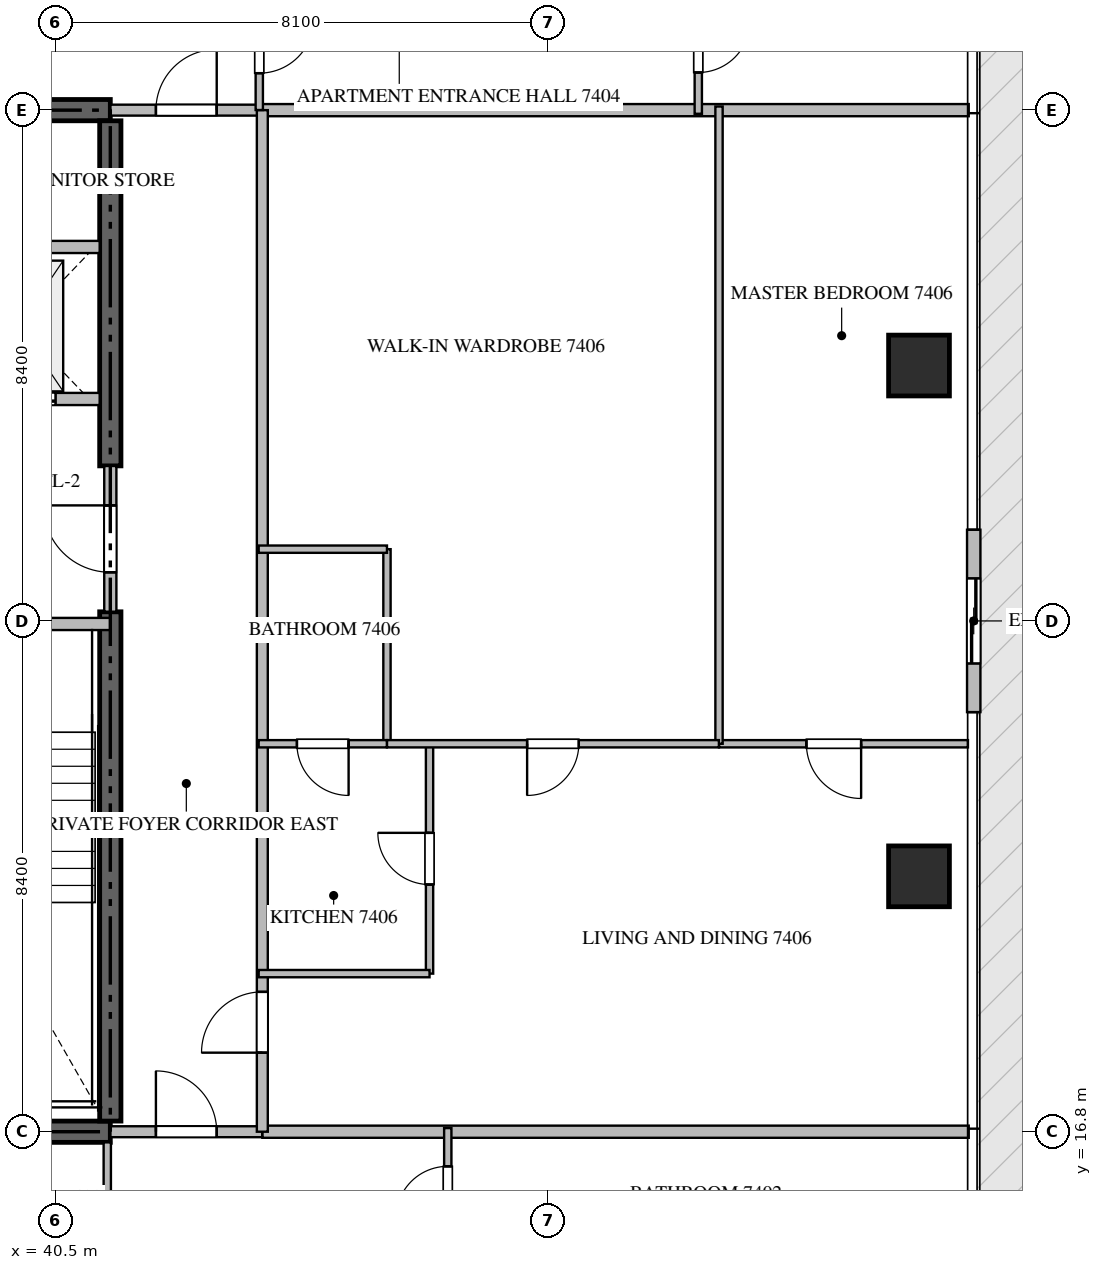
"""IFC4 building model, lengths in metres.
Left out: names, types, materials, properties, quantities, classifications, styles, units other than length and angle.
Written with IfcOpenShell. Run it as: python <this file> out.ifc"""

import sys

from ifc_helpers import new_model, si_unit, direction, frame, frame_2d, origin, origin_2d, place, context, subcontext, project, spatial, rectangle, extrude, source, transform, mapped, element, fill, save


model = new_model("IFC4")
c1 = context("Model", 3, precision=1e-05, world=origin(), true_north=direction((0.0, 1.0)))
c2 = subcontext(c1, "Body", "Model", "MODEL_VIEW")
j1 = project(units=[si_unit("LENGTHUNIT", "METRE"), si_unit("PLANEANGLEUNIT", "RADIAN")], contexts=[c1])
p1 = place(None, origin())
s1 = spatial("IfcSite", under=j1, at=p1, CompositionType="ELEMENT")
p2 = place(p1, origin())
s2 = spatial("IfcBuilding", under=s1, at=p2, CompositionType="ELEMENT")
p3 = place(p2, frame((0.0, 0.0, 297.5)))
s3 = spatial("IfcBuildingStorey", under=s2, at=p3, CompositionType="ELEMENT", Elevation=297.5)
for number, where, z_axis, x_axis in (
    (1, (23.4, 16.8, -0.26), (0.0, 0.0, 1.0), (1.0, 0.0, 0.0)),
    (2, (41.4, 33.6, -0.26), (0.0, 0.0, 1.0), (-1.0, 0.0, 0.0)),
):
    element("IfcWall", number, at=place(p3, frame(where, z_axis=z_axis, x_axis=x_axis)), inside=s3, PredefinedType="SHEAR", context=c2, shape_type="SweptSolid", body=[
        extrude(rectangle(XDim=18.0, YDim=0.35, at=frame_2d((9.0, 0.0))), origin(), (0.0, 0.0, 1.0), 4.048),
    ])
p4 = place(p3, frame((41.4, 16.975, -0.26), z_axis=(0.0, 0.0, 1.0), x_axis=(0.0, 1.0, 0.0)))
e3 = element("IfcWall", 3, at=p4, inside=s3, PredefinedType="SHEAR", context=c2, shape_type="SweptSolid", body=[
    extrude(rectangle(XDim=8.375, YDim=0.35, at=frame_2d((4.188, 0.0))), origin(), (0.0, 0.0, 1.0), 4.048),
])
p5 = place(p3, frame((41.4, 27.75, -0.26), z_axis=(0.0, 0.0, 1.0), x_axis=(0.0, 1.0, 0.0)))
e4 = element("IfcWall", 4, at=p5, inside=s3, PredefinedType="SHEAR", context=c2, shape_type="SweptSolid", body=[
    extrude(rectangle(XDim=5.675, YDim=0.35, at=frame_2d((2.837, 0.0))), origin(), (0.0, 0.0, 1.0), 4.048),
])
m1 = source(origin(), c2, "Body", "SweptSolid", [
    extrude(rectangle(XDim=1.0, YDim=1.0, at=origin_2d()), origin(), (0.0, 0.0, 1.0), 4.05),
])
for number, where, z_axis, x_axis in (
    (5, (54.7, 21.0, -0.26), (0.0, 0.0, 1.0), (1.0, 0.0, 0.0)),
    (6, (54.7, 29.4, -0.26), (0.0, 0.0, 1.0), (1.0, 0.0, 0.0)),
):
    element("IfcColumn", number, at=place(p3, frame(where, z_axis=z_axis, x_axis=x_axis)), inside=s3, PredefinedType="COLUMN", context=c2, shape_type="MappedRepresentation", body=[
        mapped(m1, transform((0.0, 0.0, 0.0), scale=1.0)),
    ])
p6 = place(p3, frame((55.6, 23.7, 0.0), z_axis=(0.0, 0.0, 1.0), x_axis=(0.0, 1.0, 0.0)))
e7 = element("IfcWall", 7, at=p6, inside=s3, PredefinedType="ELEMENTEDWALL", context=c2, shape_type="SweptSolid", body=[
    extrude(rectangle(XDim=3.0, YDim=0.22, at=frame_2d((1.5, 0.0))), origin(), (0.0, 0.0, 1.0), 3.775),
])
p7 = place(p6, frame((0.8, 0.0, 0.0)))
e8 = element("IfcOpeningElement", 8, at=p7, cuts=e7, PredefinedType="OPENING", context=c2, shape_type="SweptSolid", body=[
    extrude(rectangle(XDim=1.4, YDim=2.25, at=frame_2d((0.7, 1.125))), frame((0.0, 0.12, 0.0), z_axis=(0.0, -1.0, 0.0), x_axis=(1.0, 0.0, 0.0)), (0.0, 0.0, 1.0), 0.24),
])
p8 = place(p3, frame((36.95, 25.15, 0.0), z_axis=(0.0, 0.0, 1.0), x_axis=(1.0, 0.0, 0.0)))
e9 = element("IfcWall", 9, at=p8, inside=s3, PredefinedType="STANDARD", context=c2, shape_type="SweptSolid", body=[
    extrude(rectangle(XDim=4.45, YDim=0.2, at=frame_2d((2.225, 0.0))), origin(), (0.0, 0.0, 1.0), 3.79),
])
p9 = place(p8, frame((1.65, 0.0, 0.0)))
e10 = element("IfcOpeningElement", 10, at=p9, cuts=e9, PredefinedType="OPENING", context=c2, shape_type="SweptSolid", body=[
    extrude(rectangle(XDim=1.1, YDim=2.15, at=frame_2d((0.55, 1.075))), frame((0.0, 0.11, 0.0), z_axis=(0.0, -1.0, 0.0), x_axis=(1.0, 0.0, 0.0)), (0.0, 0.0, 1.0), 0.22),
])
p10 = place(p3, frame((38.75, 28.85, 0.0), z_axis=(0.0, 0.0, 1.0), x_axis=(1.0, 0.0, 0.0)))
e11 = element("IfcWall", 11, at=p10, inside=s3, PredefinedType="STANDARD", context=c2, shape_type="SweptSolid", body=[
    extrude(rectangle(XDim=2.475, YDim=0.2, at=frame_2d((1.238, 0.0))), origin(), (0.0, 0.0, 1.0), 3.79),
])
p11 = place(p10, frame((0.55, 0.0, 0.0)))
e12 = element("IfcOpeningElement", 12, at=p11, cuts=e11, PredefinedType="OPENING", context=c2, shape_type="SweptSolid", body=[
    extrude(rectangle(XDim=1.2, YDim=2.2, at=frame_2d((0.6, 1.1))), frame((0.0, 0.11, 0.0), z_axis=(0.0, -1.0, 0.0), x_axis=(1.0, 0.0, 0.0)), (0.0, 0.0, 1.0), 0.22),
])
p12 = place(p3, frame((38.75, 31.35, 0.0), z_axis=(0.0, 0.0, 1.0), x_axis=(1.0, 0.0, 0.0)))
e13 = element("IfcWall", 13, at=p12, inside=s3, PredefinedType="STANDARD", context=c2, shape_type="SweptSolid", body=[
    extrude(rectangle(XDim=2.475, YDim=0.2, at=frame_2d((1.238, 0.0))), origin(), (0.0, 0.0, 1.0), 3.79),
])
p13 = place(p3, frame((41.4, 25.352, 0.0), z_axis=(0.0, 0.0, 1.0), x_axis=(0.0, 1.0, 0.0)))
e14 = element("IfcWall", 14, at=p13, inside=s3, PredefinedType="STANDARD", context=c2, shape_type="SweptSolid", body=[
    extrude(rectangle(XDim=2.396, YDim=0.2, at=frame_2d((1.198, 0.0))), origin(), (0.0, 0.0, 1.0), 3.79),
])
p14 = place(p13, frame((0.648, 0.0, 0.0)))
e15 = element("IfcOpeningElement", 15, at=p14, cuts=e14, PredefinedType="OPENING", context=c2, shape_type="SweptSolid", body=[
    extrude(rectangle(XDim=1.1, YDim=2.15, at=frame_2d((0.55, 1.075))), frame((0.0, 0.11, 0.0), z_axis=(0.0, -1.0, 0.0), x_axis=(1.0, 0.0, 0.0)), (0.0, 0.0, 1.0), 0.22),
])
for number, where, z_axis, x_axis in (
    (16, (43.9, 16.8, 0.0), (0.0, 0.0, 1.0), (1.0, 0.0, 0.0)),
    (17, (43.9, 33.6, 0.0), (0.0, 0.0, 1.0), (1.0, 0.0, 0.0)),
):
    element("IfcWall", number, at=place(p3, frame(where, z_axis=z_axis, x_axis=x_axis)), inside=s3, PredefinedType="PARTITIONING", context=c2, shape_type="SweptSolid", body=[
        extrude(rectangle(XDim=11.618, YDim=0.2, at=frame_2d((5.809, 0.0))), origin(), (0.0, 0.0, 1.0), 3.79),
    ])
p15 = place(p3, frame((41.402, 16.8, 0.0), z_axis=(0.0, 0.0, 1.0), x_axis=(1.0, 0.0, 0.0)))
e18 = element("IfcWall", 18, at=p15, inside=s3, PredefinedType="PARTITIONING", context=c2, shape_type="SweptSolid", body=[
    extrude(rectangle(XDim=2.496, YDim=0.18, at=frame_2d((1.248, 0.0))), origin(), (0.0, 0.0, 1.0), 3.79),
])
p16 = place(p15, frame((0.748, 0.0, 0.0)))
e19 = element("IfcOpeningElement", 19, at=p16, cuts=e18, PredefinedType="OPENING", context=c2, shape_type="SweptSolid", body=[
    extrude(rectangle(XDim=1.0, YDim=2.15, at=frame_2d((0.5, 1.075))), frame((0.0, 0.1, 0.0), z_axis=(0.0, -1.0, 0.0), x_axis=(1.0, 0.0, 0.0)), (0.0, 0.0, 1.0), 0.2),
])
p17 = place(p3, frame((41.402, 33.6, 0.0), z_axis=(0.0, 0.0, 1.0), x_axis=(1.0, 0.0, 0.0)))
e20 = element("IfcWall", 20, at=p17, inside=s3, PredefinedType="PARTITIONING", context=c2, shape_type="SweptSolid", body=[
    extrude(rectangle(XDim=2.496, YDim=0.18, at=frame_2d((1.248, 0.0))), origin(), (0.0, 0.0, 1.0), 3.79),
])
p18 = place(p17, frame((0.748, 0.0, 0.0)))
e21 = element("IfcOpeningElement", 21, at=p18, cuts=e20, PredefinedType="OPENING", context=c2, shape_type="SweptSolid", body=[
    extrude(rectangle(XDim=1.0, YDim=2.15, at=frame_2d((0.5, 1.075))), frame((0.0, 0.1, 0.0), z_axis=(0.0, -1.0, 0.0), x_axis=(1.0, 0.0, 0.0)), (0.0, 0.0, 1.0), 0.2),
])
p19 = place(p3, frame((43.9, 16.8, 0.0), z_axis=(0.0, 0.0, 1.0), x_axis=(0.0, 1.0, 0.0)))
e22 = element("IfcWall", 22, at=p19, inside=s3, PredefinedType="PARTITIONING", context=c2, shape_type="SweptSolid", body=[
    extrude(rectangle(XDim=16.8, YDim=0.18, at=frame_2d((8.4, 0.0))), origin(), (0.0, 0.0, 1.0), 3.79),
])
p20 = place(p19, frame((1.3, 0.0, 0.0)))
e23 = element("IfcOpeningElement", 23, at=p20, cuts=e22, PredefinedType="OPENING", context=c2, shape_type="SweptSolid", body=[
    extrude(rectangle(XDim=1.0, YDim=2.15, at=frame_2d((0.5, 1.075))), frame((0.0, 0.1, 0.0), z_axis=(0.0, -1.0, 0.0), x_axis=(1.0, 0.0, 0.0)), (0.0, 0.0, 1.0), 0.2),
])
p21 = place(p3, frame((41.35, 14.05, 0.0), z_axis=(0.0, 0.0, 1.0), x_axis=(0.0, 1.0, 0.0)))
e24 = element("IfcWall", 24, at=p21, inside=s3, PredefinedType="PARTITIONING", context=c2, shape_type="SweptSolid", body=[
    extrude(rectangle(XDim=2.575, YDim=0.12, at=frame_2d((1.288, 0.0))), origin(), (0.0, 0.0, 1.0), 3.79),
])
p22 = place(p3, frame((46.95, 14.752, 0.0), z_axis=(0.0, 0.0, 1.0), x_axis=(0.0, 1.0, 0.0)))
e25 = element("IfcWall", 25, at=p22, inside=s3, PredefinedType="PARTITIONING", context=c2, shape_type="SweptSolid", body=[
    extrude(rectangle(XDim=2.108, YDim=0.12, at=frame_2d((1.054, 0.0))), origin(), (0.0, 0.0, 1.0), 3.372),
])
p23 = place(p22, frame((0.629, 0.0, 0.0)))
e26 = element("IfcOpeningElement", 26, at=p23, cuts=e25, PredefinedType="OPENING", context=c2, shape_type="SweptSolid", body=[
    extrude(rectangle(XDim=0.85, YDim=2.1, at=frame_2d((0.425, 1.05))), frame((0.0, 0.07, 0.0), z_axis=(0.0, -1.0, 0.0), x_axis=(1.0, 0.0, 0.0)), (0.0, 0.0, 1.0), 0.14),
])
p24 = place(p3, frame((43.85, 35.75, 0.0), z_axis=(0.0, 0.0, 1.0), x_axis=(0.0, -1.0, 0.0)))
e27 = element("IfcWall", 27, at=p24, inside=s3, PredefinedType="PARTITIONING", context=c2, shape_type="SweptSolid", body=[
    extrude(rectangle(XDim=2.148, YDim=0.12, at=frame_2d((1.074, 0.0))), origin(), (0.0, 0.0, 1.0), 3.79),
])
p25 = place(p24, frame((0.642, 0.0, 0.0)))
e28 = element("IfcOpeningElement", 28, at=p25, cuts=e27, PredefinedType="OPENING", context=c2, shape_type="SweptSolid", body=[
    extrude(rectangle(XDim=0.9, YDim=2.1, at=frame_2d((0.45, 1.05))), frame((0.0, 0.07, 0.0), z_axis=(0.0, -1.0, 0.0), x_axis=(1.0, 0.0, 0.0)), (0.0, 0.0, 1.0), 0.14),
])
p26 = place(p3, frame((51.07, 35.748, 0.0), z_axis=(0.0, 0.0, 1.0), x_axis=(0.0, -1.0, 0.0)))
e29 = element("IfcWall", 29, at=p26, inside=s3, PredefinedType="PARTITIONING", context=c2, shape_type="SweptSolid", body=[
    extrude(rectangle(XDim=2.208, YDim=0.12, at=frame_2d((1.104, 0.0))), origin(), (0.0, 0.0, 1.0), 3.79),
])
p27 = place(p26, frame((0.679, 0.0, 0.0)))
e30 = element("IfcOpeningElement", 30, at=p27, cuts=e29, PredefinedType="OPENING", context=c2, shape_type="SweptSolid", body=[
    extrude(rectangle(XDim=0.85, YDim=2.1, at=frame_2d((0.425, 1.05))), frame((0.0, 0.07, 0.0), z_axis=(0.0, -1.0, 0.0), x_axis=(1.0, 0.0, 0.0)), (0.0, 0.0, 1.0), 0.14),
])
p28 = place(p3, frame((46.65, 19.4, 0.0), z_axis=(0.0, 0.0, 1.0), x_axis=(0.0, 1.0, 0.0)))
e31 = element("IfcWall", 31, at=p28, inside=s3, PredefinedType="PARTITIONING", context=c2, shape_type="SweptSolid", body=[
    extrude(rectangle(XDim=3.78, YDim=0.12, at=frame_2d((1.89, 0.0))), origin(), (0.0, 0.0, 1.0), 3.79),
])
p29 = place(p28, frame((1.465, 0.0, 0.0)))
e32 = element("IfcOpeningElement", 32, at=p29, cuts=e31, PredefinedType="OPENING", context=c2, shape_type="SweptSolid", body=[
    extrude(rectangle(XDim=0.85, YDim=2.1, at=frame_2d((0.425, 1.05))), frame((0.0, 0.07, 0.0), z_axis=(0.0, -1.0, 0.0), x_axis=(1.0, 0.0, 0.0)), (0.0, 0.0, 1.0), 0.14),
])
p30 = place(p3, frame((46.65, 19.4, 0.0), z_axis=(0.0, 0.0, 1.0), x_axis=(-1.0, 0.0, 0.0)))
e33 = element("IfcWall", 33, at=p30, inside=s3, PredefinedType="PARTITIONING", context=c2, shape_type="SweptSolid", body=[
    extrude(rectangle(XDim=2.81, YDim=0.12, at=frame_2d((1.405, 0.0))), origin(), (0.0, 0.0, 1.0), 3.79),
])
p31 = place(p3, frame((55.505, 23.18, 0.0), z_axis=(0.0, 0.0, 1.0), x_axis=(-1.0, 0.0, 0.0)))
e34 = element("IfcWall", 34, at=p31, inside=s3, PredefinedType="PARTITIONING", context=c2, shape_type="SweptSolid", body=[
    extrude(rectangle(XDim=4.094, YDim=0.12, at=frame_2d((2.047, 0.0))), origin(), (0.0, 0.0, 1.0), 3.79),
])
p32 = place(p31, frame((1.757, 0.0, 0.0)))
e35 = element("IfcOpeningElement", 35, at=p32, cuts=e34, PredefinedType="OPENING", context=c2, shape_type="SweptSolid", body=[
    extrude(rectangle(XDim=0.9, YDim=2.1, at=frame_2d((0.45, 1.05))), frame((0.0, 0.07, 0.0), z_axis=(0.0, -1.0, 0.0), x_axis=(1.0, 0.0, 0.0)), (0.0, 0.0, 1.0), 0.14),
])
p33 = place(p3, frame((51.411, 23.18, 0.0), z_axis=(0.0, 0.0, 1.0), x_axis=(0.0, 1.0, 0.0)))
e36 = element("IfcWall", 36, at=p33, inside=s3, PredefinedType="PARTITIONING", context=c2, shape_type="SweptSolid", body=[
    extrude(rectangle(XDim=10.48, YDim=0.12, at=frame_2d((5.24, 0.0))), origin(), (0.0, 0.0, 1.0), 3.79),
])
p34 = place(p3, frame((45.95, 23.18, 0.0), z_axis=(0.0, 0.0, 1.0), x_axis=(0.0, 1.0, 0.0)))
e37 = element("IfcWall", 37, at=p34, inside=s3, PredefinedType="PARTITIONING", context=c2, shape_type="SweptSolid", body=[
    extrude(rectangle(XDim=3.2, YDim=0.12, at=frame_2d((1.6, 0.0))), origin(), (0.0, 0.0, 1.0), 3.79),
])
p35 = place(p3, frame((45.95, 26.38, 0.0), z_axis=(0.0, 0.0, 1.0), x_axis=(-1.0, 0.0, 0.0)))
e38 = element("IfcWall", 38, at=p35, inside=s3, PredefinedType="PARTITIONING", context=c2, shape_type="SweptSolid", body=[
    extrude(rectangle(XDim=2.11, YDim=0.12, at=frame_2d((1.055, 0.0))), origin(), (0.0, 0.0, 1.0), 3.79),
])
p36 = place(p3, frame((51.409, 23.18, 0.0), z_axis=(0.0, 0.0, 1.0), x_axis=(-1.0, 0.0, 0.0)))
e39 = element("IfcWall", 39, at=p36, inside=s3, PredefinedType="PARTITIONING", context=c2, shape_type="SweptSolid", body=[
    extrude(rectangle(XDim=5.459, YDim=0.12, at=frame_2d((2.729, 0.0))), origin(), (0.0, 0.0, 1.0), 3.79),
])
p37 = place(p36, frame((2.304, 0.0, 0.0)))
e40 = element("IfcOpeningElement", 40, at=p37, cuts=e39, PredefinedType="OPENING", context=c2, shape_type="SweptSolid", body=[
    extrude(rectangle(XDim=0.85, YDim=2.1, at=frame_2d((0.425, 1.05))), frame((0.0, 0.07, 0.0), z_axis=(0.0, -1.0, 0.0), x_axis=(1.0, 0.0, 0.0)), (0.0, 0.0, 1.0), 0.14),
])
p38 = place(p3, frame((45.948, 23.18, 0.0), z_axis=(0.0, 0.0, 1.0), x_axis=(-1.0, 0.0, 0.0)))
e41 = element("IfcWall", 41, at=p38, inside=s3, PredefinedType="PARTITIONING", context=c2, shape_type="SweptSolid", body=[
    extrude(rectangle(XDim=2.108, YDim=0.12, at=frame_2d((1.054, 0.0))), origin(), (0.0, 0.0, 1.0), 3.79),
])
p39 = place(p38, frame((0.629, 0.0, 0.0)))
e42 = element("IfcOpeningElement", 42, at=p39, cuts=e41, PredefinedType="OPENING", context=c2, shape_type="SweptSolid", body=[
    extrude(rectangle(XDim=0.85, YDim=2.1, at=frame_2d((0.425, 1.05))), frame((0.0, 0.07, 0.0), z_axis=(0.0, -1.0, 0.0), x_axis=(1.0, 0.0, 0.0)), (0.0, 0.0, 1.0), 0.14),
])
m2 = source(origin(), c2, "Body", "SweptSolid", [
    extrude(rectangle(XDim=1.4, YDim=2.25, at=frame_2d((0.7, 1.125))), frame((0.0, 0.025, 0.0), z_axis=(0.0, -1.0, 0.0), x_axis=(1.0, 0.0, 0.0)), (0.0, 0.0, 1.0), 0.05),
])
p40 = place(p7, origin())
e43 = element("IfcDoor", 43, at=p40, inside=s3, OperationType="SLIDING_TO_LEFT", PredefinedType="DOOR", context=c2, shape_type="MappedRepresentation", body=[
    mapped(m2, transform((0.0, 0.0, 0.0), scale=1.0)),
])
fill(e8, e43)
m3 = source(origin(), c2, "Body", "SweptSolid", [
    extrude(rectangle(XDim=1.2, YDim=2.2, at=frame_2d((0.6, 1.1))), frame((0.0, 0.025, 0.0), z_axis=(0.0, -1.0, 0.0), x_axis=(1.0, 0.0, 0.0)), (0.0, 0.0, 1.0), 0.05),
])
p41 = place(p11, origin())
e44 = element("IfcDoor", 44, at=p41, inside=s3, OperationType="DOUBLE_DOOR_SLIDING", PredefinedType="DOOR", context=c2, shape_type="MappedRepresentation", body=[
    mapped(m3, transform((0.0, 0.0, 0.0), scale=1.0)),
])
fill(e12, e44)
m4 = source(origin(), c2, "Body", "SweptSolid", [
    extrude(rectangle(XDim=1.1, YDim=2.15, at=frame_2d((0.55, 1.075))), frame((0.0, 0.025, 0.0), z_axis=(0.0, -1.0, 0.0), x_axis=(1.0, 0.0, 0.0)), (0.0, 0.0, 1.0), 0.05),
])
p42 = place(p14, origin())
e45 = element("IfcDoor", 45, at=p42, inside=s3, OperationType="SINGLE_SWING_RIGHT", PredefinedType="DOOR", context=c2, shape_type="MappedRepresentation", body=[
    mapped(m4, transform((0.0, 0.0, 0.0), scale=1.0)),
])
fill(e15, e45)
m5 = source(origin(), c2, "Body", "SweptSolid", [
    extrude(rectangle(XDim=1.0, YDim=2.15, at=frame_2d((0.5, 1.075))), frame((0.0, 0.025, 0.0), z_axis=(0.0, -1.0, 0.0), x_axis=(1.0, 0.0, 0.0)), (0.0, 0.0, 1.0), 0.05),
])
p43 = place(p16, origin())
e46 = element("IfcDoor", 46, at=p43, inside=s3, OperationType="SINGLE_SWING_LEFT", PredefinedType="DOOR", context=c2, shape_type="MappedRepresentation", body=[
    mapped(m5, transform((0.0, 0.0, 0.0), scale=1.0)),
])
fill(e19, e46)
p44 = place(p18, origin())
e47 = element("IfcDoor", 47, at=p44, inside=s3, OperationType="SINGLE_SWING_RIGHT", PredefinedType="DOOR", context=c2, shape_type="MappedRepresentation", body=[
    mapped(m5, transform((0.0, 0.0, 0.0), scale=1.0)),
])
fill(e21, e47)
p45 = place(p20, origin())
e48 = element("IfcDoor", 48, at=p45, inside=s3, OperationType="SINGLE_SWING_LEFT", PredefinedType="DOOR", context=c2, shape_type="MappedRepresentation", body=[
    mapped(m5, transform((0.0, 0.0, 0.0), scale=1.0)),
])
fill(e23, e48)
m6 = source(origin(), c2, "Body", "SweptSolid", [
    extrude(rectangle(XDim=0.85, YDim=2.1, at=frame_2d((0.425, 1.05))), frame((0.0, 0.025, 0.0), z_axis=(0.0, -1.0, 0.0), x_axis=(1.0, 0.0, 0.0)), (0.0, 0.0, 1.0), 0.05),
])
p46 = place(p23, origin())
e49 = element("IfcDoor", 49, at=p46, inside=s3, OperationType="SINGLE_SWING_LEFT", PredefinedType="DOOR", context=c2, shape_type="MappedRepresentation", body=[
    mapped(m6, transform((0.0, 0.0, 0.0), scale=1.0)),
])
fill(e26, e49)
m7 = source(origin(), c2, "Body", "SweptSolid", [
    extrude(rectangle(XDim=0.9, YDim=2.1, at=frame_2d((0.45, 1.05))), frame((0.0, 0.025, 0.0), z_axis=(0.0, -1.0, 0.0), x_axis=(1.0, 0.0, 0.0)), (0.0, 0.0, 1.0), 0.05),
])
p47 = place(p25, origin())
e50 = element("IfcDoor", 50, at=p47, inside=s3, OperationType="SINGLE_SWING_LEFT", PredefinedType="DOOR", context=c2, shape_type="MappedRepresentation", body=[
    mapped(m7, transform((0.0, 0.0, 0.0), scale=1.0)),
])
fill(e28, e50)
p48 = place(p27, origin())
e51 = element("IfcDoor", 51, at=p48, inside=s3, OperationType="SINGLE_SWING_LEFT", PredefinedType="DOOR", context=c2, shape_type="MappedRepresentation", body=[
    mapped(m6, transform((0.0, 0.0, 0.0), scale=1.0)),
])
fill(e30, e51)
p49 = place(p29, origin())
e52 = element("IfcDoor", 52, at=p49, inside=s3, OperationType="SINGLE_SWING_RIGHT", PredefinedType="DOOR", context=c2, shape_type="MappedRepresentation", body=[
    mapped(m6, transform((0.0, 0.0, 0.0), scale=1.0)),
])
fill(e32, e52)
p50 = place(p32, origin())
e53 = element("IfcDoor", 53, at=p50, inside=s3, OperationType="SINGLE_SWING_LEFT", PredefinedType="DOOR", context=c2, shape_type="MappedRepresentation", body=[
    mapped(m7, transform((0.0, 0.0, 0.0), scale=1.0)),
])
fill(e35, e53)
p51 = place(p37, origin())
e54 = element("IfcDoor", 54, at=p51, inside=s3, OperationType="SINGLE_SWING_RIGHT", PredefinedType="DOOR", context=c2, shape_type="MappedRepresentation", body=[
    mapped(m6, transform((0.0, 0.0, 0.0), scale=1.0)),
])
fill(e40, e54)
p52 = place(p39, origin())
e55 = element("IfcDoor", 55, at=p52, inside=s3, OperationType="SINGLE_SWING_LEFT", PredefinedType="DOOR", context=c2, shape_type="MappedRepresentation", body=[
    mapped(m6, transform((0.0, 0.0, 0.0), scale=1.0)),
])
fill(e42, e55)
save(model, sys.argv[1])
